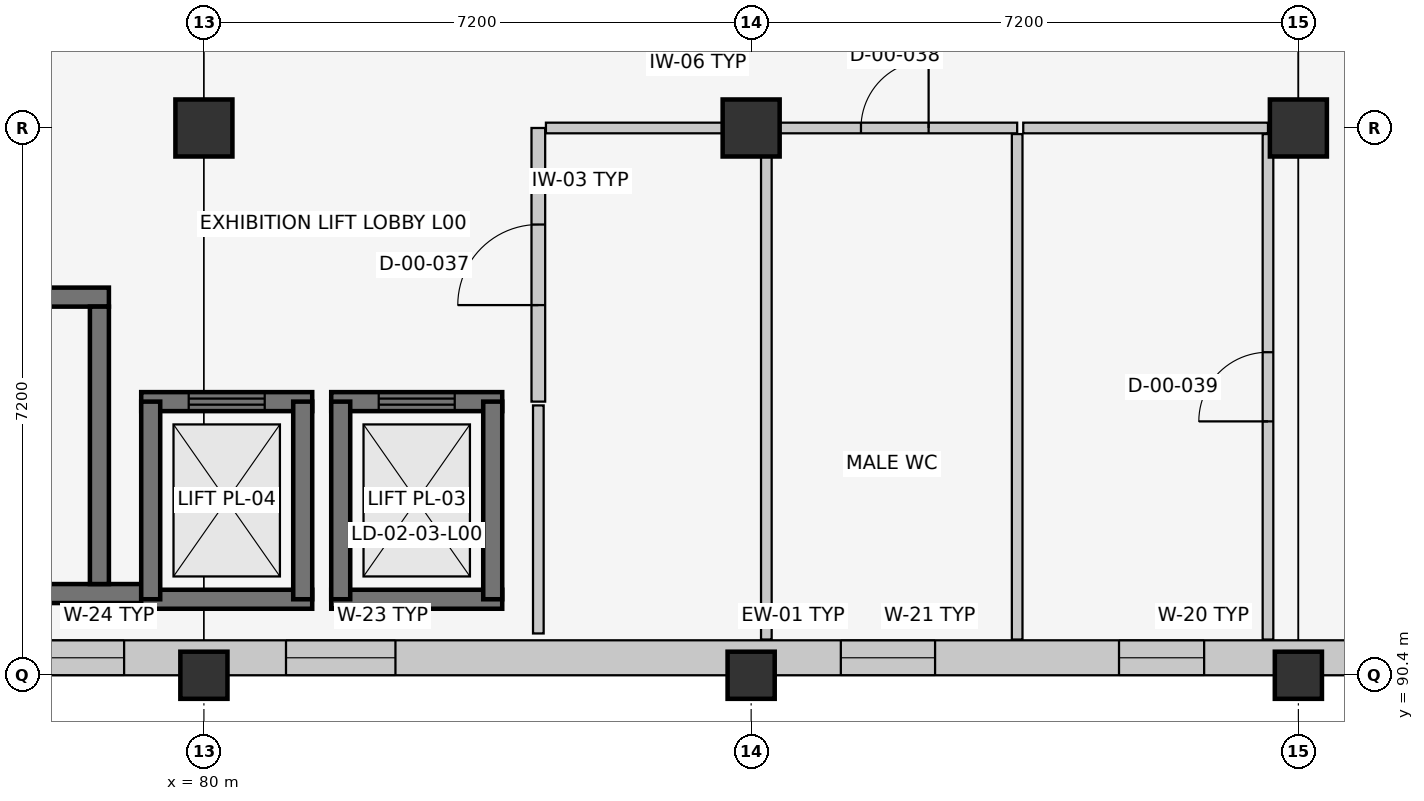
"""IFC4 building model, lengths in metres.
Left out: names, types, materials, properties, quantities, classifications, styles, units other than length and angle.
Written with IfcOpenShell. Run it as: python <this file> out.ifc"""

import sys

from ifc_helpers import new_model, si_unit, direction, frame, frame_2d, origin, origin_2d, place, context, subcontext, project, spatial, rectangle, circle, extrude, element, fill, save


model = new_model("IFC4")
c1 = context("Model", 3, precision=1e-05, world=origin(), true_north=direction((0.0, 1.0)))
c2 = subcontext(c1, "Body", "Model", "MODEL_VIEW")
j1 = project(units=[si_unit("LENGTHUNIT", "METRE"), si_unit("PLANEANGLEUNIT", "RADIAN")], contexts=[c1])
p1 = place(None, origin())
s1 = spatial("IfcSite", under=j1, at=p1, CompositionType="ELEMENT")
p2 = place(p1, origin())
s2 = spatial("IfcBuilding", under=s1, at=p2, CompositionType="ELEMENT")
p3 = place(p2, origin())
s3 = spatial("IfcBuildingStorey", under=s2, at=p3, CompositionType="ELEMENT", Elevation=0.0)
p4 = place(p3, frame((80.0, 90.4, 0.0), z_axis=(0.0, 0.0, 1.0), x_axis=(1.0, 0.0, 0.0)))
e1 = element("IfcColumn", 1, at=p4, inside=s3, PredefinedType="COLUMN", context=c2, shape_type="SweptSolid", body=[
    extrude(rectangle(XDim=0.62, YDim=0.62, at=origin_2d()), origin(), (0.0, 0.0, 1.0), 5.4),
])
p5 = place(p3, frame((80.0, 97.6, 0.0), z_axis=(0.0, 0.0, 1.0), x_axis=(1.0, 0.0, 0.0)))
e2 = element("IfcColumn", 2, at=p5, inside=s3, PredefinedType="COLUMN", context=c2, shape_type="SweptSolid", body=[
    extrude(circle(Radius=0.375, at=origin_2d()), origin(), (0.0, 0.0, 1.0), 5.4),
])
p6 = place(p3, frame((87.2, 90.4, 0.0), z_axis=(0.0, 0.0, 1.0), x_axis=(1.0, 0.0, 0.0)))
e3 = element("IfcColumn", 3, at=p6, inside=s3, PredefinedType="COLUMN", context=c2, shape_type="SweptSolid", body=[
    extrude(rectangle(XDim=0.62, YDim=0.62, at=origin_2d()), origin(), (0.0, 0.0, 1.0), 5.4),
])
p7 = place(p3, frame((87.2, 97.6, 0.0), z_axis=(0.0, 0.0, 1.0), x_axis=(1.0, 0.0, 0.0)))
e4 = element("IfcColumn", 4, at=p7, inside=s3, PredefinedType="COLUMN", context=c2, shape_type="SweptSolid", body=[
    extrude(circle(Radius=0.375, at=origin_2d()), origin(), (0.0, 0.0, 1.0), 5.4),
])
p8 = place(p3, frame((94.4, 90.4, 0.0), z_axis=(0.0, 0.0, 1.0), x_axis=(1.0, 0.0, 0.0)))
e5 = element("IfcColumn", 5, at=p8, inside=s3, PredefinedType="COLUMN", context=c2, shape_type="SweptSolid", body=[
    extrude(rectangle(XDim=0.62, YDim=0.62, at=origin_2d()), origin(), (0.0, 0.0, 1.0), 5.4),
])
p9 = place(p3, frame((94.4, 97.6, 0.0), z_axis=(0.0, 0.0, 1.0), x_axis=(1.0, 0.0, 0.0)))
e6 = element("IfcColumn", 6, at=p9, inside=s3, PredefinedType="COLUMN", context=c2, shape_type="SweptSolid", body=[
    extrude(circle(Radius=0.375, at=origin_2d()), origin(), (0.0, 0.0, 1.0), 5.4),
])
p10 = place(p3, frame((108.8, 90.63, 0.0), z_axis=(0.0, 0.0, 1.0), x_axis=(-1.0, 0.0, 0.0)))
e7 = element("IfcWall", 7, at=p10, inside=s3, PredefinedType="SOLIDWALL", context=c2, shape_type="SweptSolid", body=[
    extrude(rectangle(XDim=43.2, YDim=0.46, at=frame_2d((21.6, 0.0))), origin(), (0.0, 0.0, 1.0), 4.415),
])
p11 = place(p10, frame((9.6, 0.0, 0.0)))
e8 = element("IfcOpeningElement", 8, at=p11, cuts=e7, PredefinedType="OPENING", context=c2, shape_type="SweptSolid", body=[
    extrude(rectangle(XDim=2.4, YDim=2.4, at=frame_2d((1.2, 1.2))), frame((0.0, 0.242, 0.0), z_axis=(0.0, -1.0, 0.0), x_axis=(1.0, 0.0, 0.0)), (0.0, 0.0, 1.0), 0.484),
])
p12 = place(p10, frame((1.175, 0.0, 0.9)))
e9 = element("IfcOpeningElement", 9, at=p12, cuts=e7, PredefinedType="OPENING", context=c2, shape_type="SweptSolid", body=[
    extrude(rectangle(XDim=1.25, YDim=1.6, at=frame_2d((0.625, 0.8))), frame((0.0, 0.242, 0.0), z_axis=(0.0, -1.0, 0.0), x_axis=(1.0, 0.0, 0.0)), (0.0, 0.0, 1.0), 0.484),
])
p13 = place(p10, frame((4.71, 0.0, 0.9)))
e10 = element("IfcOpeningElement", 10, at=p13, cuts=e7, PredefinedType="OPENING", context=c2, shape_type="SweptSolid", body=[
    extrude(rectangle(XDim=1.38, YDim=1.6, at=frame_2d((0.69, 0.8))), frame((0.0, 0.242, 0.0), z_axis=(0.0, -1.0, 0.0), x_axis=(1.0, 0.0, 0.0)), (0.0, 0.0, 1.0), 0.484),
])
p14 = place(p10, frame((15.64, 0.0, 0.9)))
e11 = element("IfcOpeningElement", 11, at=p14, cuts=e7, PredefinedType="OPENING", context=c2, shape_type="SweptSolid", body=[
    extrude(rectangle(XDim=1.12, YDim=1.75, at=frame_2d((0.56, 0.875))), frame((0.0, 0.242, 0.0), z_axis=(0.0, -1.0, 0.0), x_axis=(1.0, 0.0, 0.0)), (0.0, 0.0, 1.0), 0.484),
])
p15 = place(p10, frame((19.18, 0.0, 0.9)))
e12 = element("IfcOpeningElement", 12, at=p15, cuts=e7, PredefinedType="OPENING", context=c2, shape_type="SweptSolid", body=[
    extrude(rectangle(XDim=1.24, YDim=1.75, at=frame_2d((0.62, 0.875))), frame((0.0, 0.242, 0.0), z_axis=(0.0, -1.0, 0.0), x_axis=(1.0, 0.0, 0.0)), (0.0, 0.0, 1.0), 0.484),
])
p16 = place(p10, frame((26.28, 0.0, 0.9)))
e13 = element("IfcOpeningElement", 13, at=p16, cuts=e7, PredefinedType="OPENING", context=c2, shape_type="SweptSolid", body=[
    extrude(rectangle(XDim=1.44, YDim=1.75, at=frame_2d((0.72, 0.875))), frame((0.0, 0.242, 0.0), z_axis=(0.0, -1.0, 0.0), x_axis=(1.0, 0.0, 0.0)), (0.0, 0.0, 1.0), 0.484),
])
p17 = place(p10, frame((29.85, 0.0, 0.9)))
e14 = element("IfcOpeningElement", 14, at=p17, cuts=e7, PredefinedType="OPENING", context=c2, shape_type="SweptSolid", body=[
    extrude(rectangle(XDim=1.5, YDim=1.75, at=frame_2d((0.75, 0.875))), frame((0.0, 0.242, 0.0), z_axis=(0.0, -1.0, 0.0), x_axis=(1.0, 0.0, 0.0)), (0.0, 0.0, 1.0), 0.484),
])
p18 = place(p10, frame((33.75, 0.0, 0.9)))
e15 = element("IfcOpeningElement", 15, at=p18, cuts=e7, PredefinedType="OPENING", context=c2, shape_type="SweptSolid", body=[
    extrude(rectangle(XDim=0.9, YDim=1.35, at=frame_2d((0.45, 0.675))), frame((0.0, 0.242, 0.0), z_axis=(0.0, -1.0, 0.0), x_axis=(1.0, 0.0, 0.0)), (0.0, 0.0, 1.0), 0.484),
])
p19 = place(p10, frame((40.85, 0.0, 0.9)))
e16 = element("IfcOpeningElement", 16, at=p19, cuts=e7, PredefinedType="OPENING", context=c2, shape_type="SweptSolid", body=[
    extrude(rectangle(XDim=1.1, YDim=1.35, at=frame_2d((0.55, 0.675))), frame((0.0, 0.242, 0.0), z_axis=(0.0, -1.0, 0.0), x_axis=(1.0, 0.0, 0.0)), (0.0, 0.0, 1.0), 0.484),
])
p20 = place(p3, frame((69.75, 91.475, 0.0), z_axis=(0.0, 0.0, 1.0), x_axis=(1.0, 0.0, 0.0)))
e17 = element("IfcWall", 17, at=p20, inside=s3, PredefinedType="SHEAR", context=c2, shape_type="SweptSolid", body=[
    extrude(rectangle(XDim=9.57, YDim=0.25, at=frame_2d((4.785, 0.0))), origin(), (0.0, 0.0, 1.0), 5.12),
])
p21 = place(p3, frame((78.75, 95.375, 0.0), z_axis=(0.0, 0.0, 1.0), x_axis=(-1.0, 0.0, 0.0)))
e18 = element("IfcWall", 18, at=p21, inside=s3, PredefinedType="SHEAR", context=c2, shape_type="SweptSolid", body=[
    extrude(rectangle(XDim=9.0, YDim=0.25, at=frame_2d((4.5, 0.0))), origin(), (0.0, 0.0, 1.0), 5.12),
])
p22 = place(p3, frame((78.625, 91.6, 0.0), z_axis=(0.0, 0.0, 1.0), x_axis=(0.0, 1.0, 0.0)))
e19 = element("IfcWall", 19, at=p22, inside=s3, PredefinedType="SHEAR", context=c2, shape_type="SweptSolid", body=[
    extrude(rectangle(XDim=3.65, YDim=0.25, at=frame_2d((1.825, 0.0))), origin(), (0.0, 0.0, 1.0), 5.12),
])
p23 = place(p3, frame((79.175, 91.4, 0.0), z_axis=(0.0, 0.0, 1.0), x_axis=(1.0, 0.0, 0.0)))
e20 = element("IfcWall", 20, at=p23, inside=s3, PredefinedType="SHEAR", context=c2, shape_type="SweptSolid", body=[
    extrude(rectangle(XDim=2.25, YDim=0.25, at=frame_2d((1.125, 0.0))), origin(), (0.0, 0.0, 1.0), 5.12),
])
p24 = place(p3, frame((81.425, 94.0, 0.0), z_axis=(0.0, 0.0, 1.0), x_axis=(-1.0, 0.0, 0.0)))
e21 = element("IfcWall", 21, at=p24, inside=s3, PredefinedType="SHEAR", context=c2, shape_type="SweptSolid", body=[
    extrude(rectangle(XDim=2.25, YDim=0.25, at=frame_2d((1.125, 0.0))), origin(), (0.0, 0.0, 1.0), 5.12),
])
p25 = place(p24, frame((0.625, 0.0, 0.0)))
e22 = element("IfcOpeningElement", 22, at=p25, cuts=e21, PredefinedType="OPENING", context=c2, shape_type="SweptSolid", body=[
    extrude(rectangle(XDim=1.0, YDim=2.15, at=frame_2d((0.5, 1.075))), frame((0.0, 0.137, 0.0), z_axis=(0.0, -1.0, 0.0), x_axis=(1.0, 0.0, 0.0)), (0.0, 0.0, 1.0), 0.274),
])
for number, where, z_axis, x_axis in (
    (23, (79.3, 94.0, 0.0), (0.0, 0.0, 1.0), (0.0, -1.0, 0.0)),
    (24, (81.3, 91.4, 0.0), (0.0, 0.0, 1.0), (0.0, 1.0, 0.0)),
):
    element("IfcWall", number, at=place(p3, frame(where, z_axis=z_axis, x_axis=x_axis)), inside=s3, PredefinedType="SHEAR", context=c2, shape_type="SweptSolid", body=[
        extrude(rectangle(XDim=2.6, YDim=0.25, at=frame_2d((1.3, 0.0))), origin(), (0.0, 0.0, 1.0), 5.12),
    ])
p26 = place(p3, frame((81.675, 91.4, 0.0), z_axis=(0.0, 0.0, 1.0), x_axis=(1.0, 0.0, 0.0)))
e25 = element("IfcWall", 25, at=p26, inside=s3, PredefinedType="SHEAR", context=c2, shape_type="SweptSolid", body=[
    extrude(rectangle(XDim=2.25, YDim=0.25, at=frame_2d((1.125, 0.0))), origin(), (0.0, 0.0, 1.0), 5.12),
])
p27 = place(p3, frame((83.925, 94.0, 0.0), z_axis=(0.0, 0.0, 1.0), x_axis=(-1.0, 0.0, 0.0)))
e26 = element("IfcWall", 26, at=p27, inside=s3, PredefinedType="SHEAR", context=c2, shape_type="SweptSolid", body=[
    extrude(rectangle(XDim=2.25, YDim=0.25, at=frame_2d((1.125, 0.0))), origin(), (0.0, 0.0, 1.0), 5.12),
])
p28 = place(p27, frame((0.625, 0.0, 0.0)))
e27 = element("IfcOpeningElement", 27, at=p28, cuts=e26, PredefinedType="OPENING", context=c2, shape_type="SweptSolid", body=[
    extrude(rectangle(XDim=1.0, YDim=2.15, at=frame_2d((0.5, 1.075))), frame((0.0, 0.137, 0.0), z_axis=(0.0, -1.0, 0.0), x_axis=(1.0, 0.0, 0.0)), (0.0, 0.0, 1.0), 0.274),
])
for number, where, z_axis, x_axis in (
    (28, (81.8, 94.0, 0.0), (0.0, 0.0, 1.0), (0.0, -1.0, 0.0)),
    (29, (83.8, 91.4, 0.0), (0.0, 0.0, 1.0), (0.0, 1.0, 0.0)),
):
    element("IfcWall", number, at=place(p3, frame(where, z_axis=z_axis, x_axis=x_axis)), inside=s3, PredefinedType="SHEAR", context=c2, shape_type="SweptSolid", body=[
        extrude(rectangle(XDim=2.6, YDim=0.25, at=frame_2d((1.3, 0.0))), origin(), (0.0, 0.0, 1.0), 5.12),
    ])
p29 = place(p3, frame((84.4, 94.0, 0.0), z_axis=(0.0, 0.0, 1.0), x_axis=(0.0, 1.0, 0.0)))
e30 = element("IfcWall", 30, at=p29, inside=s3, PredefinedType="PARTITIONING", context=c2, shape_type="SweptSolid", body=[
    extrude(rectangle(XDim=3.6, YDim=0.18, at=frame_2d((1.8, 0.0))), origin(), (0.0, 0.0, 1.0), 5.12),
])
p30 = place(p29, frame((1.27, 0.0, 0.0)))
e31 = element("IfcOpeningElement", 31, at=p30, cuts=e30, PredefinedType="OPENING", context=c2, shape_type="SweptSolid", body=[
    extrude(rectangle(XDim=1.06, YDim=2.1, at=frame_2d((0.53, 1.05))), frame((0.0, 0.102, 0.0), z_axis=(0.0, -1.0, 0.0), x_axis=(1.0, 0.0, 0.0)), (0.0, 0.0, 1.0), 0.204),
])
p31 = place(p3, frame((84.5, 97.6, 0.0), z_axis=(0.0, 0.0, 1.0), x_axis=(1.0, 0.0, 0.0)))
e32 = element("IfcWall", 32, at=p31, inside=s3, PredefinedType="PARTITIONING", context=c2, shape_type="SweptSolid", body=[
    extrude(rectangle(XDim=2.9, YDim=0.14, at=frame_2d((1.45, 0.0))), origin(), (0.0, 0.0, 1.0), 4.395),
])
p32 = place(p3, frame((87.4, 90.87, 0.0), z_axis=(0.0, 0.0, 1.0), x_axis=(0.0, 1.0, 0.0)))
e33 = element("IfcWall", 33, at=p32, inside=s3, PredefinedType="PARTITIONING", context=c2, shape_type="SweptSolid", body=[
    extrude(rectangle(XDim=6.65, YDim=0.14, at=frame_2d((3.325, 0.0))), origin(), (0.0, 0.0, 1.0), 4.495),
])
p33 = place(p3, frame((87.48, 97.6, 0.0), z_axis=(0.0, 0.0, 1.0), x_axis=(1.0, 0.0, 0.0)))
e34 = element("IfcWall", 34, at=p33, inside=s3, PredefinedType="PARTITIONING", context=c2, shape_type="SweptSolid", body=[
    extrude(rectangle(XDim=3.22, YDim=0.14, at=frame_2d((1.61, 0.0))), origin(), (0.0, 0.0, 1.0), 4.345),
])
p34 = place(p33, frame((1.165, 0.0, 0.0)))
e35 = element("IfcOpeningElement", 35, at=p34, cuts=e34, PredefinedType="OPENING", context=c2, shape_type="SweptSolid", body=[
    extrude(rectangle(XDim=0.89, YDim=2.05, at=frame_2d((0.445, 1.025))), frame((0.0, 0.082, 0.0), z_axis=(0.0, -1.0, 0.0), x_axis=(1.0, 0.0, 0.0)), (0.0, 0.0, 1.0), 0.164),
])
p35 = place(p3, frame((90.7, 90.87, 0.0), z_axis=(0.0, 0.0, 1.0), x_axis=(0.0, 1.0, 0.0)))
e36 = element("IfcWall", 36, at=p35, inside=s3, PredefinedType="PARTITIONING", context=c2, shape_type="SweptSolid", body=[
    extrude(rectangle(XDim=6.65, YDim=0.14, at=frame_2d((3.325, 0.0))), origin(), (0.0, 0.0, 1.0), 4.785),
])
p36 = place(p3, frame((90.78, 97.6, 0.0), z_axis=(0.0, 0.0, 1.0), x_axis=(1.0, 0.0, 0.0)))
e37 = element("IfcWall", 37, at=p36, inside=s3, PredefinedType="PARTITIONING", context=c2, shape_type="SweptSolid", body=[
    extrude(rectangle(XDim=3.22, YDim=0.14, at=frame_2d((1.61, 0.0))), origin(), (0.0, 0.0, 1.0), 4.345),
])
p37 = place(p3, frame((94.0, 90.87, 0.0), z_axis=(0.0, 0.0, 1.0), x_axis=(0.0, 1.0, 0.0)))
e38 = element("IfcWall", 38, at=p37, inside=s3, PredefinedType="PARTITIONING", context=c2, shape_type="SweptSolid", body=[
    extrude(rectangle(XDim=6.65, YDim=0.14, at=frame_2d((3.325, 0.0))), origin(), (0.0, 0.0, 1.0), 5.12),
])
p38 = place(p37, frame((2.87, 0.0, 0.0)))
e39 = element("IfcOpeningElement", 39, at=p38, cuts=e38, PredefinedType="OPENING", context=c2, shape_type="SweptSolid", body=[
    extrude(rectangle(XDim=0.91, YDim=2.06, at=frame_2d((0.455, 1.03))), frame((0.0, 0.082, 0.0), z_axis=(0.0, -1.0, 0.0), x_axis=(1.0, 0.0, 0.0)), (0.0, 0.0, 1.0), 0.164),
])
p39 = place(p3, frame((84.4, 90.95, 0.0), z_axis=(0.0, 0.0, 1.0), x_axis=(0.0, 1.0, 0.0)))
e40 = element("IfcWall", 40, at=p39, inside=s3, PredefinedType="PARTITIONING", context=c2, shape_type="SweptSolid", body=[
    extrude(rectangle(XDim=3.0, YDim=0.14, at=frame_2d((1.5, 0.0))), origin(), (0.0, 0.0, 1.0), 5.12),
])
p40 = place(p14, origin())
e41 = element("IfcWindow", 41, at=p40, inside=s3, PartitioningType="SINGLE_PANEL", PredefinedType="WINDOW", context=c2, shape_type="SweptSolid", body=[
    extrude(rectangle(XDim=1.12, YDim=1.75, at=frame_2d((0.56, 0.875))), frame((0.0, 0.03, 0.0), z_axis=(0.0, -1.0, 0.0), x_axis=(1.0, 0.0, 0.0)), (0.0, 0.0, 1.0), 0.06),
])
fill(e11, e41)
p41 = place(p15, origin())
e42 = element("IfcWindow", 42, at=p41, inside=s3, PartitioningType="SINGLE_PANEL", PredefinedType="WINDOW", context=c2, shape_type="SweptSolid", body=[
    extrude(rectangle(XDim=1.24, YDim=1.75, at=frame_2d((0.62, 0.875))), frame((0.0, 0.03, 0.0), z_axis=(0.0, -1.0, 0.0), x_axis=(1.0, 0.0, 0.0)), (0.0, 0.0, 1.0), 0.06),
])
fill(e12, e42)
p42 = place(p16, origin())
e43 = element("IfcWindow", 43, at=p42, inside=s3, PartitioningType="SINGLE_PANEL", PredefinedType="WINDOW", context=c2, shape_type="SweptSolid", body=[
    extrude(rectangle(XDim=1.44, YDim=1.75, at=frame_2d((0.72, 0.875))), frame((0.0, 0.03, 0.0), z_axis=(0.0, -1.0, 0.0), x_axis=(1.0, 0.0, 0.0)), (0.0, 0.0, 1.0), 0.06),
])
fill(e13, e43)
p43 = place(p17, origin())
e44 = element("IfcWindow", 44, at=p43, inside=s3, PartitioningType="SINGLE_PANEL", PredefinedType="WINDOW", context=c2, shape_type="SweptSolid", body=[
    extrude(rectangle(XDim=1.5, YDim=1.75, at=frame_2d((0.75, 0.875))), frame((0.0, 0.03, 0.0), z_axis=(0.0, -1.0, 0.0), x_axis=(1.0, 0.0, 0.0)), (0.0, 0.0, 1.0), 0.06),
])
fill(e14, e44)
p44 = place(p25, origin())
e45 = element("IfcDoor", 45, at=p44, inside=s3, OperationType="SLIDING_TO_LEFT", PredefinedType="DOOR", context=c2, shape_type="SweptSolid", body=[
    extrude(rectangle(XDim=1.0, YDim=2.15, at=frame_2d((0.5, 1.075))), frame((0.0, 0.025, 0.0), z_axis=(0.0, -1.0, 0.0), x_axis=(1.0, 0.0, 0.0)), (0.0, 0.0, 1.0), 0.05),
])
fill(e22, e45)
p45 = place(p28, origin())
e46 = element("IfcDoor", 46, at=p45, inside=s3, OperationType="SLIDING_TO_LEFT", PredefinedType="DOOR", context=c2, shape_type="SweptSolid", body=[
    extrude(rectangle(XDim=1.0, YDim=2.15, at=frame_2d((0.5, 1.075))), frame((0.0, 0.025, 0.0), z_axis=(0.0, -1.0, 0.0), x_axis=(1.0, 0.0, 0.0)), (0.0, 0.0, 1.0), 0.05),
])
fill(e27, e46)
p46 = place(p30, origin())
e47 = element("IfcDoor", 47, at=p46, inside=s3, OperationType="SINGLE_SWING_LEFT", PredefinedType="DOOR", context=c2, shape_type="SweptSolid", body=[
    extrude(rectangle(XDim=1.06, YDim=2.1, at=frame_2d((0.53, 1.05))), frame((0.0, 0.025, 0.0), z_axis=(0.0, -1.0, 0.0), x_axis=(1.0, 0.0, 0.0)), (0.0, 0.0, 1.0), 0.05),
])
fill(e31, e47)
p47 = place(p34, origin())
e48 = element("IfcDoor", 48, at=p47, inside=s3, OperationType="SINGLE_SWING_RIGHT", PredefinedType="DOOR", context=c2, shape_type="SweptSolid", body=[
    extrude(rectangle(XDim=0.89, YDim=2.05, at=frame_2d((0.445, 1.025))), frame((0.0, 0.025, 0.0), z_axis=(0.0, -1.0, 0.0), x_axis=(1.0, 0.0, 0.0)), (0.0, 0.0, 1.0), 0.05),
])
fill(e35, e48)
p48 = place(p38, origin())
e49 = element("IfcDoor", 49, at=p48, inside=s3, OperationType="SINGLE_SWING_LEFT", PredefinedType="DOOR", context=c2, shape_type="SweptSolid", body=[
    extrude(rectangle(XDim=0.91, YDim=2.06, at=frame_2d((0.455, 1.03))), frame((0.0, 0.025, 0.0), z_axis=(0.0, -1.0, 0.0), x_axis=(1.0, 0.0, 0.0)), (0.0, 0.0, 1.0), 0.05),
])
fill(e39, e49)
save(model, sys.argv[1])
